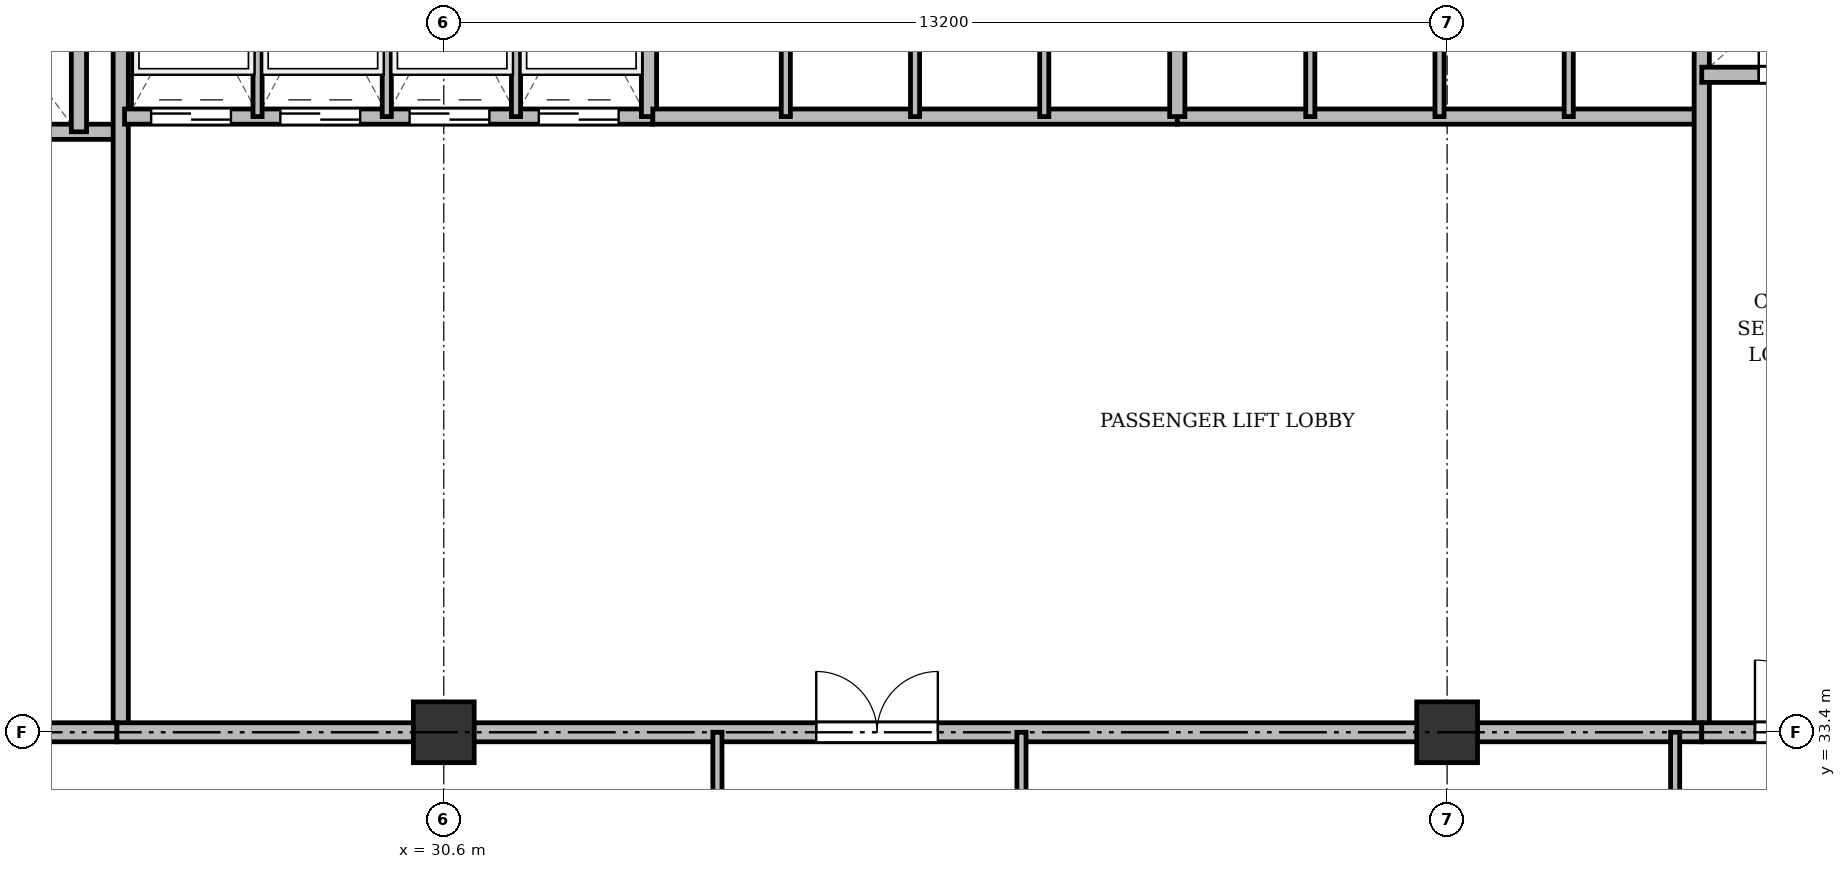
"""IFC4 building model, lengths in metres.
Left out: names, types, materials, properties, quantities, classifications, styles, units other than length and angle.
Written with IfcOpenShell. Run it as: python <this file> out.ifc"""

import sys

from ifc_helpers import new_model, si_unit, direction, frame, frame_2d, origin, origin_2d, place, context, subcontext, project, spatial, rectangle, extrude, source, transform, mapped, element, fill, save


model = new_model("IFC4")
c1 = context("Model", 3, precision=1e-05, world=origin(), true_north=direction((0.0, 1.0)))
c2 = subcontext(c1, "Body", "Model", "MODEL_VIEW")
j1 = project(units=[si_unit("LENGTHUNIT", "METRE"), si_unit("PLANEANGLEUNIT", "RADIAN")], contexts=[c1])
p1 = place(None, origin())
s1 = spatial("IfcSite", under=j1, at=p1, CompositionType="ELEMENT")
p2 = place(p1, origin())
s2 = spatial("IfcBuilding", under=s1, at=p2, CompositionType="ELEMENT")
p3 = place(p2, frame((0.0, 0.0, 96.1)))
s3 = spatial("IfcBuildingStorey", under=s2, at=p3, CompositionType="ELEMENT", Elevation=96.1)
m1 = source(origin(), c2, "Body", "SweptSolid", [
    extrude(rectangle(XDim=0.8, YDim=0.8, at=origin_2d()), origin(), (0.0, 0.0, 1.0), 3.6),
])
for number, where, z_axis, x_axis in (
    (1, (30.6, 33.4, 0.0), (0.0, 0.0, 1.0), (1.0, 0.0, 0.0)),
    (2, (43.8, 33.4, 0.0), (0.0, 0.0, 1.0), (1.0, 0.0, 0.0)),
):
    element("IfcColumn", number, at=place(p3, frame(where, z_axis=z_axis, x_axis=x_axis)), inside=s3, PredefinedType="COLUMN", context=c2, shape_type="MappedRepresentation", body=[
        mapped(m1, transform((0.0, 0.0, 0.0), x_axis=(1.0, 0.0, 0.0), y_axis=(0.0, 1.0, 0.0), z_axis=(0.0, 0.0, 1.0), scale=1.0)),
    ])
p4 = place(p3, frame((19.55, 41.3, 0.0), z_axis=(0.0, 0.0, 1.0), x_axis=(1.0, 0.0, 0.0)))
e3 = element("IfcWall", 3, at=p4, inside=s3, PredefinedType="SOLIDWALL", context=c2, shape_type="SweptSolid", body=[
    extrude(rectangle(XDim=6.75, YDim=0.2, at=frame_2d((3.375, 0.0))), origin(), (0.0, 0.0, 1.0), 3.34),
])
p5 = place(p4, frame((1.7, 0.0, 0.0)))
e4 = element("IfcOpeningElement", 4, at=p5, cuts=e3, PredefinedType="OPENING", context=c2, shape_type="SweptSolid", body=[
    extrude(rectangle(XDim=1.1, YDim=2.15, at=frame_2d((0.55, 1.075))), frame((0.0, 0.11, 0.0), z_axis=(0.0, -1.0, 0.0), x_axis=(1.0, 0.0, 0.0)), (0.0, 0.0, 1.0), 0.22),
])
p6 = place(p4, frame((4.4, 0.0, 0.0)))
e5 = element("IfcOpeningElement", 5, at=p6, cuts=e3, PredefinedType="OPENING", context=c2, shape_type="SweptSolid", body=[
    extrude(rectangle(XDim=1.1, YDim=2.15, at=frame_2d((0.55, 1.075))), frame((0.0, 0.11, 0.0), z_axis=(0.0, -1.0, 0.0), x_axis=(1.0, 0.0, 0.0)), (0.0, 0.0, 1.0), 0.22),
])
p7 = place(p3, frame((25.8, 41.3, 0.0), z_axis=(0.0, 0.0, 1.0), x_axis=(0.0, 1.0, 0.0)))
e6 = element("IfcWall", 6, at=p7, inside=s3, PredefinedType="SOLIDWALL", context=c2, shape_type="SweptSolid", body=[
    extrude(rectangle(XDim=3.4, YDim=0.2, at=frame_2d((1.7, 0.0))), origin(), (0.0, 0.0, 1.0), 3.34),
])
p8 = place(p3, frame((26.35, 33.4, 0.0), z_axis=(0.0, 0.0, 1.0), x_axis=(0.0, 1.0, 0.0)))
e7 = element("IfcWall", 7, at=p8, inside=s3, PredefinedType="SOLIDWALL", context=c2, shape_type="SweptSolid", body=[
    extrude(rectangle(XDim=11.3, YDim=0.2, at=frame_2d((5.65, 0.0))), origin(), (0.0, 0.0, 1.0), 2.752),
])
p9 = place(p3, frame((19.5, 33.4, 0.0), z_axis=(0.0, 0.0, 1.0), x_axis=(1.0, 0.0, 0.0)))
e8 = element("IfcWall", 8, at=p9, inside=s3, PredefinedType="PARTITIONING", context=c2, shape_type="SweptSolid", body=[
    extrude(rectangle(XDim=6.8, YDim=0.25, at=frame_2d((3.4, 0.0))), origin(), (0.0, 0.0, 1.0), 2.752),
])
p10 = place(p9, frame((0.75, 0.0, 0.0)))
e9 = element("IfcOpeningElement", 9, at=p10, cuts=e8, PredefinedType="OPENING", context=c2, shape_type="SweptSolid", body=[
    extrude(rectangle(XDim=1.6, YDim=2.2, at=frame_2d((0.8, 1.1))), frame((0.0, 0.135, 0.0), z_axis=(0.0, -1.0, 0.0), x_axis=(1.0, 0.0, 0.0)), (0.0, 0.0, 1.0), 0.27),
])
p11 = place(p3, frame((26.4, 41.5, 0.0), z_axis=(0.0, 0.0, 1.0), x_axis=(1.0, 0.0, 0.0)))
e10 = element("IfcWall", 10, at=p11, inside=s3, PredefinedType="SOLIDWALL", context=c2, shape_type="SweptSolid", body=[
    extrude(rectangle(XDim=6.95, YDim=0.2, at=frame_2d((3.475, 0.0))), origin(), (0.0, 0.0, 1.0), 3.34),
])
p12 = place(p11, frame((0.35, 0.0, 0.0)))
e11 = element("IfcOpeningElement", 11, at=p12, cuts=e10, PredefinedType="OPENING", context=c2, shape_type="SweptSolid", body=[
    extrude(rectangle(XDim=1.05, YDim=2.15, at=frame_2d((0.525, 1.075))), frame((0.0, 0.11, 0.0), z_axis=(0.0, -1.0, 0.0), x_axis=(1.0, 0.0, 0.0)), (0.0, 0.0, 1.0), 0.22),
])
p13 = place(p11, frame((2.05, 0.0, 0.0)))
e12 = element("IfcOpeningElement", 12, at=p13, cuts=e10, PredefinedType="OPENING", context=c2, shape_type="SweptSolid", body=[
    extrude(rectangle(XDim=1.05, YDim=2.15, at=frame_2d((0.525, 1.075))), frame((0.0, 0.11, 0.0), z_axis=(0.0, -1.0, 0.0), x_axis=(1.0, 0.0, 0.0)), (0.0, 0.0, 1.0), 0.22),
])
p14 = place(p11, frame((3.75, 0.0, 0.0)))
e13 = element("IfcOpeningElement", 13, at=p14, cuts=e10, PredefinedType="OPENING", context=c2, shape_type="SweptSolid", body=[
    extrude(rectangle(XDim=1.05, YDim=2.15, at=frame_2d((0.525, 1.075))), frame((0.0, 0.11, 0.0), z_axis=(0.0, -1.0, 0.0), x_axis=(1.0, 0.0, 0.0)), (0.0, 0.0, 1.0), 0.22),
])
p15 = place(p11, frame((5.45, 0.0, 0.0)))
e14 = element("IfcOpeningElement", 14, at=p15, cuts=e10, PredefinedType="OPENING", context=c2, shape_type="SweptSolid", body=[
    extrude(rectangle(XDim=1.05, YDim=2.15, at=frame_2d((0.525, 1.075))), frame((0.0, 0.11, 0.0), z_axis=(0.0, -1.0, 0.0), x_axis=(1.0, 0.0, 0.0)), (0.0, 0.0, 1.0), 0.22),
])
p16 = place(p3, frame((33.3, 41.5, 0.0), z_axis=(0.0, 0.0, 1.0), x_axis=(0.0, 1.0, 0.0)))
e15 = element("IfcWall", 15, at=p16, inside=s3, PredefinedType="SOLIDWALL", context=c2, shape_type="SweptSolid", body=[
    extrude(rectangle(XDim=3.2, YDim=0.2, at=frame_2d((1.6, 0.0))), origin(), (0.0, 0.0, 1.0), 3.34),
])
for number, where, z_axis, x_axis in (
    (16, (28.15, 41.5, 0.0), (0.0, 0.0, 1.0), (0.0, 1.0, 0.0)),
    (17, (29.85, 41.5, 0.0), (0.0, 0.0, 1.0), (0.0, 1.0, 0.0)),
    (18, (31.55, 41.5, 0.0), (0.0, 0.0, 1.0), (0.0, 1.0, 0.0)),
):
    element("IfcWall", number, at=place(p3, frame(where, z_axis=z_axis, x_axis=x_axis)), inside=s3, PredefinedType="PARTITIONING", context=c2, shape_type="SweptSolid", body=[
        extrude(rectangle(XDim=3.2, YDim=0.12, at=frame_2d((1.6, 0.0))), origin(), (0.0, 0.0, 1.0), 3.34),
    ])
p17 = place(p3, frame((33.35, 41.5, 0.0), z_axis=(0.0, 0.0, 1.0), x_axis=(1.0, 0.0, 0.0)))
e19 = element("IfcWall", 19, at=p17, inside=s3, PredefinedType="SOLIDWALL", context=c2, shape_type="SweptSolid", body=[
    extrude(rectangle(XDim=6.9, YDim=0.2, at=frame_2d((3.45, 0.0))), origin(), (0.0, 0.0, 1.0), 3.34),
])
for number, where, z_axis, x_axis in (
    (20, (35.1, 41.5, 0.0), (0.0, 0.0, 1.0), (0.0, 1.0, 0.0)),
    (21, (36.8, 41.5, 0.0), (0.0, 0.0, 1.0), (0.0, 1.0, 0.0)),
    (22, (38.5, 41.5, 0.0), (0.0, 0.0, 1.0), (0.0, 1.0, 0.0)),
):
    element("IfcWall", number, at=place(p3, frame(where, z_axis=z_axis, x_axis=x_axis)), inside=s3, PredefinedType="PARTITIONING", context=c2, shape_type="SweptSolid", body=[
        extrude(rectangle(XDim=3.2, YDim=0.12, at=frame_2d((1.6, 0.0))), origin(), (0.0, 0.0, 1.0), 3.34),
    ])
p18 = place(p3, frame((40.25, 41.5, 0.0), z_axis=(0.0, 0.0, 1.0), x_axis=(1.0, 0.0, 0.0)))
e23 = element("IfcWall", 23, at=p18, inside=s3, PredefinedType="SOLIDWALL", context=c2, shape_type="SweptSolid", body=[
    extrude(rectangle(XDim=6.9, YDim=0.2, at=frame_2d((3.45, 0.0))), origin(), (0.0, 0.0, 1.0), 2.84),
])
p19 = place(p3, frame((40.25, 41.5, 0.0), z_axis=(0.0, 0.0, 1.0), x_axis=(0.0, 1.0, 0.0)))
e24 = element("IfcWall", 24, at=p19, inside=s3, PredefinedType="SOLIDWALL", context=c2, shape_type="SweptSolid", body=[
    extrude(rectangle(XDim=3.2, YDim=0.2, at=frame_2d((1.6, 0.0))), origin(), (0.0, 0.0, 1.0), 3.34),
])
p20 = place(p3, frame((42.0, 41.5, 0.0), z_axis=(0.0, 0.0, 1.0), x_axis=(0.0, 1.0, 0.0)))
e25 = element("IfcWall", 25, at=p20, inside=s3, PredefinedType="PARTITIONING", context=c2, shape_type="SweptSolid", body=[
    extrude(rectangle(XDim=3.2, YDim=0.12, at=frame_2d((1.6, 0.0))), origin(), (0.0, 0.0, 1.0), 3.34),
])
p21 = place(p3, frame((43.7, 41.5, 0.0), z_axis=(0.0, 0.0, 1.0), x_axis=(0.0, 1.0, 0.0)))
e26 = element("IfcWall", 26, at=p21, inside=s3, PredefinedType="PARTITIONING", context=c2, shape_type="SweptSolid", body=[
    extrude(rectangle(XDim=3.2, YDim=0.12, at=frame_2d((1.6, 0.0))), origin(), (0.0, 0.0, 1.0), 2.84),
])
p22 = place(p3, frame((45.4, 41.5, 0.0), z_axis=(0.0, 0.0, 1.0), x_axis=(0.0, 1.0, 0.0)))
e27 = element("IfcWall", 27, at=p22, inside=s3, PredefinedType="PARTITIONING", context=c2, shape_type="SweptSolid", body=[
    extrude(rectangle(XDim=3.2, YDim=0.12, at=frame_2d((1.6, 0.0))), origin(), (0.0, 0.0, 1.0), 3.34),
])
p23 = place(p3, frame((47.15, 33.4, 0.0), z_axis=(0.0, 0.0, 1.0), x_axis=(0.0, 1.0, 0.0)))
e28 = element("IfcWall", 28, at=p23, inside=s3, PredefinedType="SOLIDWALL", context=c2, shape_type="SweptSolid", body=[
    extrude(rectangle(XDim=11.3, YDim=0.2, at=frame_2d((5.65, 0.0))), origin(), (0.0, 0.0, 1.0), 2.752),
])
p24 = place(p3, frame((26.3, 33.4, 0.0), z_axis=(0.0, 0.0, 1.0), x_axis=(1.0, 0.0, 0.0)))
e29 = element("IfcWall", 29, at=p24, inside=s3, PredefinedType="PARTITIONING", context=c2, shape_type="SweptSolid", body=[
    extrude(rectangle(XDim=20.85, YDim=0.25, at=frame_2d((10.425, 0.0))), origin(), (0.0, 0.0, 1.0), 2.752),
])
p25 = place(p24, frame((9.2, 0.0, 0.0)))
e30 = element("IfcOpeningElement", 30, at=p25, cuts=e29, PredefinedType="OPENING", context=c2, shape_type="SweptSolid", body=[
    extrude(rectangle(XDim=1.6, YDim=2.2, at=frame_2d((0.8, 1.1))), frame((0.0, 0.135, 0.0), z_axis=(0.0, -1.0, 0.0), x_axis=(1.0, 0.0, 0.0)), (0.0, 0.0, 1.0), 0.27),
])
p26 = place(p3, frame((47.15, 42.05, 0.0), z_axis=(0.0, 0.0, 1.0), x_axis=(1.0, 0.0, 0.0)))
e31 = element("IfcWall", 31, at=p26, inside=s3, PredefinedType="SOLIDWALL", context=c2, shape_type="SweptSolid", body=[
    extrude(rectangle(XDim=7.85, YDim=0.2, at=frame_2d((3.925, 0.0))), origin(), (0.0, 0.0, 1.0), 2.84),
])
p27 = place(p26, frame((0.75, 0.0, 0.0)))
e32 = element("IfcOpeningElement", 32, at=p27, cuts=e31, PredefinedType="OPENING", context=c2, shape_type="SweptSolid", body=[
    extrude(rectangle(XDim=0.9, YDim=2.1, at=frame_2d((0.45, 1.05))), frame((0.0, 0.11, 0.0), z_axis=(0.0, -1.0, 0.0), x_axis=(1.0, 0.0, 0.0)), (0.0, 0.0, 1.0), 0.22),
])
p28 = place(p26, frame((3.85, 0.0, 0.0)))
e33 = element("IfcOpeningElement", 33, at=p28, cuts=e31, PredefinedType="OPENING", context=c2, shape_type="SweptSolid", body=[
    extrude(rectangle(XDim=0.9, YDim=2.1, at=frame_2d((0.45, 1.05))), frame((0.0, 0.11, 0.0), z_axis=(0.0, -1.0, 0.0), x_axis=(1.0, 0.0, 0.0)), (0.0, 0.0, 1.0), 0.22),
])
p29 = place(p3, frame((47.15, 33.4, 0.0), z_axis=(0.0, 0.0, 1.0), x_axis=(1.0, 0.0, 0.0)))
e34 = element("IfcWall", 34, at=p29, inside=s3, PredefinedType="PARTITIONING", context=c2, shape_type="SweptSolid", body=[
    extrude(rectangle(XDim=11.15, YDim=0.25, at=frame_2d((5.575, 0.0))), origin(), (0.0, 0.0, 1.0), 2.752),
])
p30 = place(p29, frame((0.7, 0.0, 0.0)))
e35 = element("IfcOpeningElement", 35, at=p30, cuts=e34, PredefinedType="OPENING", context=c2, shape_type="SweptSolid", body=[
    extrude(rectangle(XDim=0.95, YDim=2.15, at=frame_2d((0.475, 1.075))), frame((0.0, 0.135, 0.0), z_axis=(0.0, -1.0, 0.0), x_axis=(1.0, 0.0, 0.0)), (0.0, 0.0, 1.0), 0.27),
])
p31 = place(p29, frame((6.0, 0.0, 0.0)))
e36 = element("IfcOpeningElement", 36, at=p31, cuts=e34, PredefinedType="OPENING", context=c2, shape_type="SweptSolid", body=[
    extrude(rectangle(XDim=1.2, YDim=2.15, at=frame_2d((0.6, 1.075))), frame((0.0, 0.135, 0.0), z_axis=(0.0, -1.0, 0.0), x_axis=(1.0, 0.0, 0.0)), (0.0, 0.0, 1.0), 0.27),
])
for number, where, z_axis, x_axis in (
    (37, (34.2, 29.8, 0.0), (0.0, 0.0, 1.0), (0.0, 1.0, 0.0)),
    (38, (38.2, 29.8, 0.0), (0.0, 0.0, 1.0), (0.0, 1.0, 0.0)),
    (39, (46.8, 29.8, 0.0), (0.0, 0.0, 1.0), (0.0, 1.0, 0.0)),
):
    element("IfcWall", number, at=place(p3, frame(where, z_axis=z_axis, x_axis=x_axis)), inside=s3, PredefinedType="PARTITIONING", context=c2, shape_type="SweptSolid", body=[
        extrude(rectangle(XDim=3.6, YDim=0.12, at=frame_2d((1.8, 0.0))), origin(), (0.0, 0.0, 1.0), 2.752),
    ])
m2 = source(origin(), c2, "Body", "SweptSolid", [
    extrude(rectangle(XDim=1.05, YDim=2.15, at=frame_2d((0.525, 1.075))), frame((0.0, 0.025, 0.0), z_axis=(0.0, -1.0, 0.0), x_axis=(1.0, 0.0, 0.0)), (0.0, 0.0, 1.0), 0.05),
])
p32 = place(p12, origin())
e40 = element("IfcDoor", 40, at=p32, inside=s3, OperationType="DOUBLE_DOOR_SLIDING", PredefinedType="DOOR", context=c2, shape_type="MappedRepresentation", body=[
    mapped(m2, transform((0.0, 0.0, 0.0), x_axis=(1.0, 0.0, 0.0), y_axis=(0.0, 1.0, 0.0), z_axis=(0.0, 0.0, 1.0), scale=1.0)),
])
fill(e11, e40)
p33 = place(p13, origin())
e41 = element("IfcDoor", 41, at=p33, inside=s3, OperationType="DOUBLE_DOOR_SLIDING", PredefinedType="DOOR", context=c2, shape_type="MappedRepresentation", body=[
    mapped(m2, transform((0.0, 0.0, 0.0), x_axis=(1.0, 0.0, 0.0), y_axis=(0.0, 1.0, 0.0), z_axis=(0.0, 0.0, 1.0), scale=1.0)),
])
fill(e12, e41)
p34 = place(p14, origin())
e42 = element("IfcDoor", 42, at=p34, inside=s3, OperationType="DOUBLE_DOOR_SLIDING", PredefinedType="DOOR", context=c2, shape_type="MappedRepresentation", body=[
    mapped(m2, transform((0.0, 0.0, 0.0), x_axis=(1.0, 0.0, 0.0), y_axis=(0.0, 1.0, 0.0), z_axis=(0.0, 0.0, 1.0), scale=1.0)),
])
fill(e13, e42)
p35 = place(p15, origin())
e43 = element("IfcDoor", 43, at=p35, inside=s3, OperationType="DOUBLE_DOOR_SLIDING", PredefinedType="DOOR", context=c2, shape_type="MappedRepresentation", body=[
    mapped(m2, transform((0.0, 0.0, 0.0), x_axis=(1.0, 0.0, 0.0), y_axis=(0.0, 1.0, 0.0), z_axis=(0.0, 0.0, 1.0), scale=1.0)),
])
fill(e14, e43)
m3 = source(origin(), c2, "Body", "SweptSolid", [
    extrude(rectangle(XDim=1.6, YDim=2.2, at=frame_2d((0.8, 1.1))), frame((0.0, 0.025, 0.0), z_axis=(0.0, -1.0, 0.0), x_axis=(1.0, 0.0, 0.0)), (0.0, 0.0, 1.0), 0.05),
])
p36 = place(p25, origin())
e44 = element("IfcDoor", 44, at=p36, inside=s3, OperationType="DOUBLE_DOOR_SINGLE_SWING", PredefinedType="DOOR", context=c2, shape_type="MappedRepresentation", body=[
    mapped(m3, transform((0.0, 0.0, 0.0), x_axis=(1.0, 0.0, 0.0), y_axis=(0.0, 1.0, 0.0), z_axis=(0.0, 0.0, 1.0), scale=1.0)),
])
fill(e30, e44)
m4 = source(origin(), c2, "Body", "SweptSolid", [
    extrude(rectangle(XDim=0.9, YDim=2.1, at=frame_2d((0.45, 1.05))), frame((0.0, 0.025, 0.0), z_axis=(0.0, -1.0, 0.0), x_axis=(1.0, 0.0, 0.0)), (0.0, 0.0, 1.0), 0.05),
])
p37 = place(p27, origin())
e45 = element("IfcDoor", 45, at=p37, inside=s3, OperationType="SINGLE_SWING_LEFT", PredefinedType="DOOR", context=c2, shape_type="MappedRepresentation", body=[
    mapped(m4, transform((0.0, 0.0, 0.0), x_axis=(1.0, 0.0, 0.0), y_axis=(0.0, 1.0, 0.0), z_axis=(0.0, 0.0, 1.0), scale=1.0)),
])
fill(e32, e45)
m5 = source(origin(), c2, "Body", "SweptSolid", [
    extrude(rectangle(XDim=0.95, YDim=2.15, at=frame_2d((0.475, 1.075))), frame((0.0, 0.025, 0.0), z_axis=(0.0, -1.0, 0.0), x_axis=(1.0, 0.0, 0.0)), (0.0, 0.0, 1.0), 0.05),
])
p38 = place(p30, origin())
e46 = element("IfcDoor", 46, at=p38, inside=s3, OperationType="SINGLE_SWING_LEFT", PredefinedType="DOOR", context=c2, shape_type="MappedRepresentation", body=[
    mapped(m5, transform((0.0, 0.0, 0.0), x_axis=(1.0, 0.0, 0.0), y_axis=(0.0, 1.0, 0.0), z_axis=(0.0, 0.0, 1.0), scale=1.0)),
])
fill(e35, e46)
save(model, sys.argv[1])
